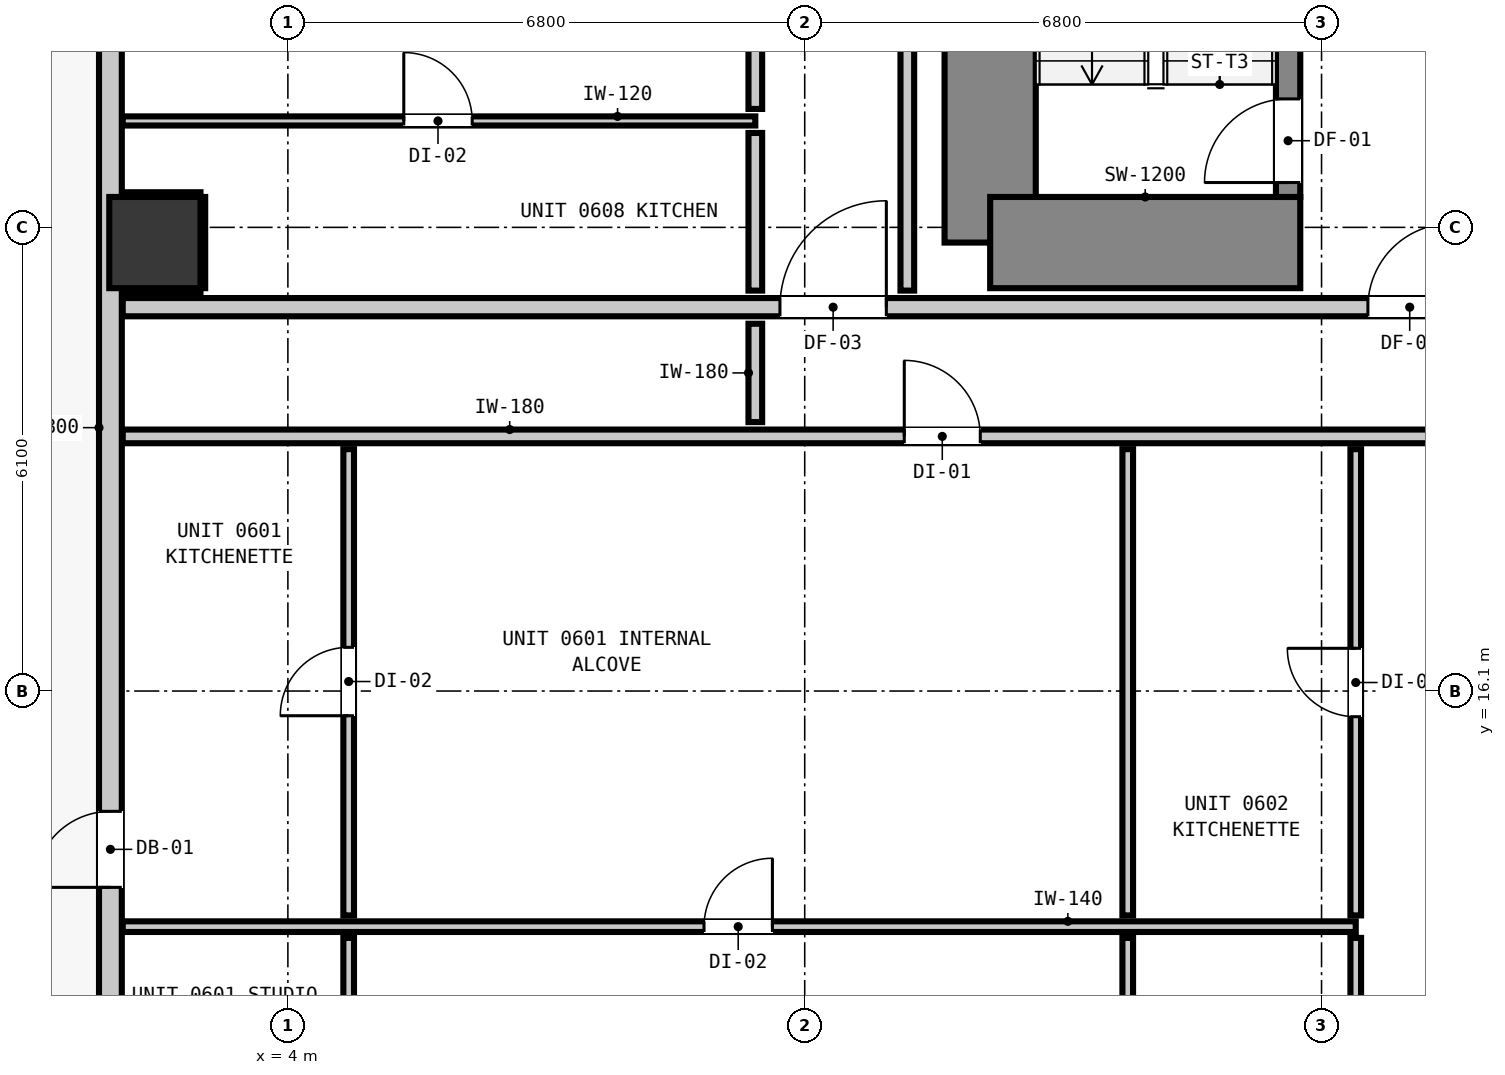
"""IFC4 building model, lengths in metres.
Left out: names, types, materials, properties, quantities, classifications, styles, units other than length and angle.
Written with IfcOpenShell. Run it as: python <this file> out.ifc"""

import sys

from ifc_helpers import new_model, si_unit, direction, frame, frame_2d, origin, origin_2d, place, context, subcontext, project, spatial, rectangle, extrude, element, fill, save


model = new_model("IFC4")
c1 = context("Model", 3, precision=1e-05, world=origin(), true_north=direction((0.0, 1.0)))
c2 = subcontext(c1, "Body", "Model", "MODEL_VIEW")
j1 = project(units=[si_unit("LENGTHUNIT", "METRE"), si_unit("PLANEANGLEUNIT", "RADIAN")], contexts=[c1])
p1 = place(None, origin())
s1 = spatial("IfcSite", under=j1, at=p1, CompositionType="ELEMENT")
p2 = place(p1, origin())
s2 = spatial("IfcBuilding", under=s1, at=p2, CompositionType="ELEMENT")
p3 = place(p2, frame((0.0, 0.0, 25.32)))
s3 = spatial("IfcBuildingStorey", under=s2, at=p3, CompositionType="ELEMENT", Elevation=25.32)
p4 = place(p3, frame((13.24, 22.0, 0.0), z_axis=(0.0, 0.0, 1.0), x_axis=(0.0, 1.0, 0.0)))
e1 = element("IfcWall", 1, at=p4, inside=s3, PredefinedType="SHEAR", context=c2, shape_type="SweptSolid", body=[
    extrude(rectangle(XDim=8.195, YDim=1.2, at=frame_2d((4.098, 0.0))), origin(), (0.0, 0.0, 1.0), 3.32),
])
p5 = place(p3, frame((13.24, 22.0, 0.0), z_axis=(0.0, 0.0, 1.0), x_axis=(1.0, 0.0, 0.0)))
e2 = element("IfcWall", 2, at=p5, inside=s3, PredefinedType="SHEAR", context=c2, shape_type="SweptSolid", body=[
    extrude(rectangle(XDim=4.08, YDim=1.2, at=frame_2d((2.04, 0.0))), origin(), (0.0, 0.0, 1.0), 3.32),
])
p6 = place(p3, frame((17.16, 22.6, 0.0), z_axis=(0.0, 0.0, 1.0), x_axis=(0.0, 1.0, 0.0)))
e3 = element("IfcWall", 3, at=p6, inside=s3, PredefinedType="SHEAR", context=c2, shape_type="SweptSolid", body=[
    extrude(rectangle(XDim=7.8, YDim=0.32, at=frame_2d((3.9, 0.0))), origin(), (0.0, 0.0, 1.0), 3.32),
])
p7 = place(p6, frame((0.19, 0.0, 0.0)))
e4 = element("IfcOpeningElement", 4, at=p7, cuts=e3, PredefinedType="OPENING", context=c2, shape_type="SweptSolid", body=[
    extrude(rectangle(XDim=1.1, YDim=2.15, at=frame_2d((0.55, 1.075))), frame((0.0, 0.17, 0.0), z_axis=(0.0, -1.0, 0.0), x_axis=(1.0, 0.0, 0.0)), (0.0, 0.0, 1.0), 0.34),
])
p8 = place(p3, frame((2.25, 22.0, 0.0), z_axis=(0.0, 0.0, 1.0), x_axis=(1.0, 0.0, 0.0)))
e5 = element("IfcColumn", 5, at=p8, inside=s3, PredefinedType="COLUMN", context=c2, shape_type="SweptSolid", body=[
    extrude(rectangle(XDim=1.2, YDim=1.2, at=origin_2d()), origin(), (0.0, 0.0, 1.0), 3.32),
])
p9 = place(p3, frame((1.665, 10.165, 0.0), z_axis=(0.0, 0.0, 1.0), x_axis=(0.0, 1.0, 0.0)))
e6 = element("IfcWall", 6, at=p9, inside=s3, PredefinedType="STANDARD", context=c2, shape_type="SweptSolid", body=[
    extrude(rectangle(XDim=34.67, YDim=0.3, at=frame_2d((17.335, 0.0))), origin(), (0.0, 0.0, 1.0), 3.06),
])
p10 = place(p9, frame((3.352, 0.0, 0.0)))
e7 = element("IfcOpeningElement", 7, at=p10, cuts=e6, PredefinedType="OPENING", context=c2, shape_type="SweptSolid", body=[
    extrude(rectangle(XDim=1.0, YDim=2.15, at=frame_2d((0.5, 1.075))), frame((0.0, 0.16, 0.0), z_axis=(0.0, -1.0, 0.0), x_axis=(1.0, 0.0, 0.0)), (0.0, 0.0, 1.0), 0.32),
])
p11 = place(p9, frame((14.448, 0.0, 0.85)))
e8 = element("IfcOpeningElement", 8, at=p11, cuts=e6, PredefinedType="OPENING", context=c2, shape_type="SweptSolid", body=[
    extrude(rectangle(XDim=1.65, YDim=1.75, at=frame_2d((0.825, 0.875))), frame((0.0, 0.16, 0.0), z_axis=(0.0, -1.0, 0.0), x_axis=(1.0, 0.0, 0.0)), (0.0, 0.0, 1.0), 0.32),
])
p12 = place(p9, frame((17.598, 0.0, 0.85)))
e9 = element("IfcOpeningElement", 9, at=p12, cuts=e6, PredefinedType="OPENING", context=c2, shape_type="SweptSolid", body=[
    extrude(rectangle(XDim=1.65, YDim=1.75, at=frame_2d((0.825, 0.875))), frame((0.0, 0.16, 0.0), z_axis=(0.0, -1.0, 0.0), x_axis=(1.0, 0.0, 0.0)), (0.0, 0.0, 1.0), 0.32),
])
p13 = place(p9, frame((23.982, 0.0, 0.85)))
e10 = element("IfcOpeningElement", 10, at=p13, cuts=e6, PredefinedType="OPENING", context=c2, shape_type="SweptSolid", body=[
    extrude(rectangle(XDim=1.65, YDim=1.75, at=frame_2d((0.825, 0.875))), frame((0.0, 0.16, 0.0), z_axis=(0.0, -1.0, 0.0), x_axis=(1.0, 0.0, 0.0)), (0.0, 0.0, 1.0), 0.32),
])
p14 = place(p9, frame((27.333, 0.0, 0.85)))
e11 = element("IfcOpeningElement", 11, at=p14, cuts=e6, PredefinedType="OPENING", context=c2, shape_type="SweptSolid", body=[
    extrude(rectangle(XDim=1.05, YDim=1.65, at=frame_2d((0.525, 0.825))), frame((0.0, 0.16, 0.0), z_axis=(0.0, -1.0, 0.0), x_axis=(1.0, 0.0, 0.0)), (0.0, 0.0, 1.0), 0.32),
])
p15 = place(p3, frame((1.827, 21.15, 0.0), z_axis=(0.0, 0.0, 1.0), x_axis=(1.0, 0.0, 0.0)))
e12 = element("IfcWall", 12, at=p15, inside=s3, PredefinedType="PARTITIONING", context=c2, shape_type="SweptSolid", body=[
    extrude(rectangle(XDim=42.146, YDim=0.24, at=frame_2d((21.073, 0.0))), origin(), (0.0, 0.0, 1.0), 3.06),
])
p16 = place(p15, frame((16.383, 0.0, 0.0)))
e13 = element("IfcOpeningElement", 13, at=p16, cuts=e12, PredefinedType="OPENING", context=c2, shape_type="SweptSolid", body=[
    extrude(rectangle(XDim=1.1, YDim=2.15, at=frame_2d((0.55, 1.075))), frame((0.0, 0.13, 0.0), z_axis=(0.0, -1.0, 0.0), x_axis=(1.0, 0.0, 0.0)), (0.0, 0.0, 1.0), 0.26),
])
p17 = place(p15, frame((8.647, 0.0, 0.0)))
e14 = element("IfcOpeningElement", 14, at=p17, cuts=e12, PredefinedType="OPENING", context=c2, shape_type="SweptSolid", body=[
    extrude(rectangle(XDim=1.4, YDim=2.15, at=frame_2d((0.7, 1.075))), frame((0.0, 0.13, 0.0), z_axis=(0.0, -1.0, 0.0), x_axis=(1.0, 0.0, 0.0)), (0.0, 0.0, 1.0), 0.26),
])
p18 = place(p15, frame((38.524, 0.0, 0.0)))
e15 = element("IfcOpeningElement", 15, at=p18, cuts=e12, PredefinedType="OPENING", context=c2, shape_type="SweptSolid", body=[
    extrude(rectangle(XDim=1.0, YDim=2.15, at=frame_2d((0.5, 1.075))), frame((0.0, 0.13, 0.0), z_axis=(0.0, -1.0, 0.0), x_axis=(1.0, 0.0, 0.0)), (0.0, 0.0, 1.0), 0.26),
])
p19 = place(p3, frame((1.827, 19.45, 0.0), z_axis=(0.0, 0.0, 1.0), x_axis=(1.0, 0.0, 0.0)))
e16 = element("IfcWall", 16, at=p19, inside=s3, PredefinedType="PARTITIONING", context=c2, shape_type="SweptSolid", body=[
    extrude(rectangle(XDim=42.146, YDim=0.18, at=frame_2d((21.073, 0.0))), origin(), (0.0, 0.0, 1.0), 3.06),
])
p20 = place(p19, frame((10.283, 0.0, 0.0)))
e17 = element("IfcOpeningElement", 17, at=p20, cuts=e16, PredefinedType="OPENING", context=c2, shape_type="SweptSolid", body=[
    extrude(rectangle(XDim=1.0, YDim=2.15, at=frame_2d((0.5, 1.075))), frame((0.0, 0.1, 0.0), z_axis=(0.0, -1.0, 0.0), x_axis=(1.0, 0.0, 0.0)), (0.0, 0.0, 1.0), 0.2),
])
p21 = place(p19, frame((17.475, 0.0, 0.0)))
e18 = element("IfcOpeningElement", 18, at=p21, cuts=e16, PredefinedType="OPENING", context=c2, shape_type="SweptSolid", body=[
    extrude(rectangle(XDim=1.0, YDim=2.15, at=frame_2d((0.5, 1.075))), frame((0.0, 0.1, 0.0), z_axis=(0.0, -1.0, 0.0), x_axis=(1.0, 0.0, 0.0)), (0.0, 0.0, 1.0), 0.2),
])
p22 = place(p19, frame((25.928, 0.0, 0.0)))
e19 = element("IfcOpeningElement", 19, at=p22, cuts=e16, PredefinedType="OPENING", context=c2, shape_type="SweptSolid", body=[
    extrude(rectangle(XDim=1.0, YDim=2.15, at=frame_2d((0.5, 1.075))), frame((0.0, 0.1, 0.0), z_axis=(0.0, -1.0, 0.0), x_axis=(1.0, 0.0, 0.0)), (0.0, 0.0, 1.0), 0.2),
])
p23 = place(p19, frame((35.193, 0.0, 0.0)))
e20 = element("IfcOpeningElement", 20, at=p23, cuts=e16, PredefinedType="OPENING", context=c2, shape_type="SweptSolid", body=[
    extrude(rectangle(XDim=1.0, YDim=2.15, at=frame_2d((0.5, 1.075))), frame((0.0, 0.1, 0.0), z_axis=(0.0, -1.0, 0.0), x_axis=(1.0, 0.0, 0.0)), (0.0, 0.0, 1.0), 0.2),
])
p24 = place(p3, frame((1.827, 13.0, 0.0), z_axis=(0.0, 0.0, 1.0), x_axis=(1.0, 0.0, 0.0)))
e21 = element("IfcWall", 21, at=p24, inside=s3, PredefinedType="PARTITIONING", context=c2, shape_type="SweptSolid", body=[
    extrude(rectangle(XDim=16.223, YDim=0.14, at=frame_2d((8.112, 0.0))), origin(), (0.0, 0.0, 1.0), 3.06),
])
p25 = place(p24, frame((7.648, 0.0, 0.0)))
e22 = element("IfcOpeningElement", 22, at=p25, cuts=e21, PredefinedType="OPENING", context=c2, shape_type="SweptSolid", body=[
    extrude(rectangle(XDim=0.9, YDim=2.1, at=frame_2d((0.45, 1.05))), frame((0.0, 0.08, 0.0), z_axis=(0.0, -1.0, 0.0), x_axis=(1.0, 0.0, 0.0)), (0.0, 0.0, 1.0), 0.16),
])
p26 = place(p3, frame((1.827, 23.6, 0.0), z_axis=(0.0, 0.0, 1.0), x_axis=(1.0, 0.0, 0.0)))
e23 = element("IfcWall", 23, at=p26, inside=s3, PredefinedType="PARTITIONING", context=c2, shape_type="SweptSolid", body=[
    extrude(rectangle(XDim=8.323, YDim=0.12, at=frame_2d((4.162, 0.0))), origin(), (0.0, 0.0, 1.0), 3.06),
])
p27 = place(p26, frame((3.698, 0.0, 0.0)))
e24 = element("IfcOpeningElement", 24, at=p27, cuts=e23, PredefinedType="OPENING", context=c2, shape_type="SweptSolid", body=[
    extrude(rectangle(XDim=0.9, YDim=2.1, at=frame_2d((0.45, 1.05))), frame((0.0, 0.07, 0.0), z_axis=(0.0, -1.0, 0.0), x_axis=(1.0, 0.0, 0.0)), (0.0, 0.0, 1.0), 0.14),
])
p28 = place(p3, frame((10.15, 19.638, 0.0), z_axis=(0.0, 0.0, 1.0), x_axis=(0.0, 1.0, 0.0)))
e25 = element("IfcWall", 25, at=p28, inside=s3, PredefinedType="PARTITIONING", context=c2, shape_type="SweptSolid", body=[
    extrude(rectangle(XDim=1.294, YDim=0.18, at=frame_2d((0.647, 0.0))), origin(), (0.0, 0.0, 1.0), 3.06),
])
p29 = place(p3, frame((10.15, 21.368, 0.0), z_axis=(0.0, 0.0, 1.0), x_axis=(0.0, 1.0, 0.0)))
e26 = element("IfcWall", 26, at=p29, inside=s3, PredefinedType="PARTITIONING", context=c2, shape_type="SweptSolid", body=[
    extrude(rectangle(XDim=2.074, YDim=0.18, at=frame_2d((1.037, 0.0))), origin(), (0.0, 0.0, 1.0), 3.06),
])
p30 = place(p3, frame((10.15, 23.758, 0.0), z_axis=(0.0, 0.0, 1.0), x_axis=(0.0, 1.0, 0.0)))
e27 = element("IfcWall", 27, at=p30, inside=s3, PredefinedType="PARTITIONING", context=c2, shape_type="SweptSolid", body=[
    extrude(rectangle(XDim=3.349, YDim=0.18, at=frame_2d((1.674, 0.0))), origin(), (0.0, 0.0, 1.0), 3.06),
])
p31 = place(p30, frame((1.18, 0.0, 0.0)))
e28 = element("IfcOpeningElement", 28, at=p31, cuts=e27, PredefinedType="OPENING", context=c2, shape_type="SweptSolid", body=[
    extrude(rectangle(XDim=1.0, YDim=2.15, at=frame_2d((0.5, 1.075))), frame((0.0, 0.1, 0.0), z_axis=(0.0, -1.0, 0.0), x_axis=(1.0, 0.0, 0.0)), (0.0, 0.0, 1.0), 0.2),
])
p32 = place(p3, frame((12.15, 21.368, 0.0), z_axis=(0.0, 0.0, 1.0), x_axis=(0.0, 1.0, 0.0)))
e29 = element("IfcWall", 29, at=p32, inside=s3, PredefinedType="PARTITIONING", context=c2, shape_type="SweptSolid", body=[
    extrude(rectangle(XDim=18.694, YDim=0.18, at=frame_2d((9.347, 0.0))), origin(), (0.0, 0.0, 1.0), 3.06),
])
p33 = place(p3, frame((4.8, 7.827, 0.0), z_axis=(0.0, 0.0, 1.0), x_axis=(0.0, 1.0, 0.0)))
e30 = element("IfcWall", 30, at=p33, inside=s3, PredefinedType="PARTITIONING", context=c2, shape_type="SweptSolid", body=[
    extrude(rectangle(XDim=5.025, YDim=0.14, at=frame_2d((2.513, 0.0))), origin(), (0.0, 0.0, 1.0), 3.06),
])
p34 = place(p33, frame((2.143, 0.0, 0.0)))
e31 = element("IfcOpeningElement", 31, at=p34, cuts=e30, PredefinedType="OPENING", context=c2, shape_type="SweptSolid", body=[
    extrude(rectangle(XDim=0.86, YDim=2.02, at=frame_2d((0.43, 1.01))), frame((0.0, 0.08, 0.0), z_axis=(0.0, -1.0, 0.0), x_axis=(1.0, 0.0, 0.0)), (0.0, 0.0, 1.0), 0.16),
])
p35 = place(p3, frame((4.8, 13.148, 0.0), z_axis=(0.0, 0.0, 1.0), x_axis=(0.0, 1.0, 0.0)))
e32 = element("IfcWall", 32, at=p35, inside=s3, PredefinedType="PARTITIONING", context=c2, shape_type="SweptSolid", body=[
    extrude(rectangle(XDim=6.134, YDim=0.14, at=frame_2d((3.067, 0.0))), origin(), (0.0, 0.0, 1.0), 3.06),
])
p36 = place(p35, frame((2.627, 0.0, 0.0)))
e33 = element("IfcOpeningElement", 33, at=p36, cuts=e32, PredefinedType="OPENING", context=c2, shape_type="SweptSolid", body=[
    extrude(rectangle(XDim=0.9, YDim=2.1, at=frame_2d((0.45, 1.05))), frame((0.0, 0.08, 0.0), z_axis=(0.0, -1.0, 0.0), x_axis=(1.0, 0.0, 0.0)), (0.0, 0.0, 1.0), 0.16),
])
p37 = place(p3, frame((15.05, 7.827, 0.0), z_axis=(0.0, 0.0, 1.0), x_axis=(0.0, 1.0, 0.0)))
e34 = element("IfcWall", 34, at=p37, inside=s3, PredefinedType="PARTITIONING", context=c2, shape_type="SweptSolid", body=[
    extrude(rectangle(XDim=5.025, YDim=0.14, at=frame_2d((2.513, 0.0))), origin(), (0.0, 0.0, 1.0), 3.06),
])
p38 = place(p3, frame((15.05, 13.148, 0.0), z_axis=(0.0, 0.0, 1.0), x_axis=(0.0, 1.0, 0.0)))
e35 = element("IfcWall", 35, at=p38, inside=s3, PredefinedType="PARTITIONING", context=c2, shape_type="SweptSolid", body=[
    extrude(rectangle(XDim=6.134, YDim=0.14, at=frame_2d((3.067, 0.0))), origin(), (0.0, 0.0, 1.0), 3.06),
])
p39 = place(p3, frame((18.05, 7.827, 0.0), z_axis=(0.0, 0.0, 1.0), x_axis=(0.0, 1.0, 0.0)))
e36 = element("IfcWall", 36, at=p39, inside=s3, PredefinedType="PARTITIONING", context=c2, shape_type="SweptSolid", body=[
    extrude(rectangle(XDim=5.025, YDim=0.14, at=frame_2d((2.513, 0.0))), origin(), (0.0, 0.0, 1.0), 3.06),
])
p40 = place(p39, frame((2.156, 0.0, 0.0)))
e37 = element("IfcOpeningElement", 37, at=p40, cuts=e36, PredefinedType="OPENING", context=c2, shape_type="SweptSolid", body=[
    extrude(rectangle(XDim=0.86, YDim=2.02, at=frame_2d((0.43, 1.01))), frame((0.0, 0.08, 0.0), z_axis=(0.0, -1.0, 0.0), x_axis=(1.0, 0.0, 0.0)), (0.0, 0.0, 1.0), 0.16),
])
p41 = place(p3, frame((18.05, 13.148, 0.0), z_axis=(0.0, 0.0, 1.0), x_axis=(0.0, 1.0, 0.0)))
e38 = element("IfcWall", 38, at=p41, inside=s3, PredefinedType="PARTITIONING", context=c2, shape_type="SweptSolid", body=[
    extrude(rectangle(XDim=6.134, YDim=0.14, at=frame_2d((3.067, 0.0))), origin(), (0.0, 0.0, 1.0), 3.06),
])
p42 = place(p41, frame((2.614, 0.0, 0.0)))
e39 = element("IfcOpeningElement", 39, at=p42, cuts=e38, PredefinedType="OPENING", context=c2, shape_type="SweptSolid", body=[
    extrude(rectangle(XDim=0.9, YDim=2.1, at=frame_2d((0.45, 1.05))), frame((0.0, 0.08, 0.0), z_axis=(0.0, -1.0, 0.0), x_axis=(1.0, 0.0, 0.0)), (0.0, 0.0, 1.0), 0.16),
])
for number, where, z_axis, x_axis in (
    (40, (1.83, 21.368, 0.0), (0.0, 0.0, 1.0), (1.0, 0.0, 0.0)),
    (41, (1.83, 22.632, 0.0), (0.0, 0.0, 1.0), (1.0, 0.0, 0.0)),
):
    element("IfcWall", number, at=place(p3, frame(where, z_axis=z_axis, x_axis=x_axis)), inside=s3, PredefinedType="PARTITIONING", context=c2, shape_type="SweptSolid", body=[
        extrude(rectangle(XDim=1.02, YDim=0.06, at=frame_2d((0.51, 0.0))), origin(), (0.0, 0.0, 1.0), 1.45),
    ])
p43 = place(p3, frame((2.882, 21.4, 0.0), z_axis=(0.0, 0.0, 1.0), x_axis=(0.0, 1.0, 0.0)))
e42 = element("IfcWall", 42, at=p43, inside=s3, PredefinedType="PARTITIONING", context=c2, shape_type="SweptSolid", body=[
    extrude(rectangle(XDim=1.2, YDim=0.06, at=frame_2d((0.6, 0.0))), origin(), (0.0, 0.0, 1.0), 1.45),
])
p44 = place(p10, origin())
e43 = element("IfcDoor", 43, at=p44, inside=s3, OperationType="SINGLE_SWING_LEFT", PredefinedType="DOOR", context=c2, shape_type="SweptSolid", body=[
    extrude(rectangle(XDim=1.0, YDim=2.15, at=frame_2d((0.5, 1.075))), frame((0.0, 0.025, 0.0), z_axis=(0.0, -1.0, 0.0), x_axis=(1.0, 0.0, 0.0)), (0.0, 0.0, 1.0), 0.05),
])
fill(e7, e43)
p45 = place(p7, origin())
e44 = element("IfcDoor", 44, at=p45, inside=s3, OperationType="SINGLE_SWING_LEFT", PredefinedType="DOOR", context=c2, shape_type="SweptSolid", body=[
    extrude(rectangle(XDim=1.1, YDim=2.15, at=frame_2d((0.55, 1.075))), frame((0.0, 0.025, 0.0), z_axis=(0.0, -1.0, 0.0), x_axis=(1.0, 0.0, 0.0)), (0.0, 0.0, 1.0), 0.05),
])
fill(e4, e44)
p46 = place(p16, origin())
e45 = element("IfcDoor", 45, at=p46, inside=s3, OperationType="SINGLE_SWING_RIGHT", PredefinedType="DOOR", context=c2, shape_type="SweptSolid", body=[
    extrude(rectangle(XDim=1.1, YDim=2.15, at=frame_2d((0.55, 1.075))), frame((0.0, 0.025, 0.0), z_axis=(0.0, -1.0, 0.0), x_axis=(1.0, 0.0, 0.0)), (0.0, 0.0, 1.0), 0.05),
])
fill(e13, e45)
p47 = place(p17, origin())
e46 = element("IfcDoor", 46, at=p47, inside=s3, OperationType="SINGLE_SWING_RIGHT", PredefinedType="DOOR", context=c2, shape_type="SweptSolid", body=[
    extrude(rectangle(XDim=1.4, YDim=2.15, at=frame_2d((0.7, 1.075))), frame((0.0, 0.025, 0.0), z_axis=(0.0, -1.0, 0.0), x_axis=(1.0, 0.0, 0.0)), (0.0, 0.0, 1.0), 0.05),
])
fill(e14, e46)
p48 = place(p20, origin())
e47 = element("IfcDoor", 47, at=p48, inside=s3, OperationType="SINGLE_SWING_LEFT", PredefinedType="DOOR", context=c2, shape_type="SweptSolid", body=[
    extrude(rectangle(XDim=1.0, YDim=2.15, at=frame_2d((0.5, 1.075))), frame((0.0, 0.025, 0.0), z_axis=(0.0, -1.0, 0.0), x_axis=(1.0, 0.0, 0.0)), (0.0, 0.0, 1.0), 0.05),
])
fill(e17, e47)
p49 = place(p25, origin())
e48 = element("IfcDoor", 48, at=p49, inside=s3, OperationType="SINGLE_SWING_RIGHT", PredefinedType="DOOR", context=c2, shape_type="SweptSolid", body=[
    extrude(rectangle(XDim=0.9, YDim=2.1, at=frame_2d((0.45, 1.05))), frame((0.0, 0.025, 0.0), z_axis=(0.0, -1.0, 0.0), x_axis=(1.0, 0.0, 0.0)), (0.0, 0.0, 1.0), 0.05),
])
fill(e22, e48)
p50 = place(p36, origin())
e49 = element("IfcDoor", 49, at=p50, inside=s3, OperationType="SINGLE_SWING_LEFT", PredefinedType="DOOR", context=c2, shape_type="SweptSolid", body=[
    extrude(rectangle(XDim=0.9, YDim=2.1, at=frame_2d((0.45, 1.05))), frame((0.0, 0.025, 0.0), z_axis=(0.0, -1.0, 0.0), x_axis=(1.0, 0.0, 0.0)), (0.0, 0.0, 1.0), 0.05),
])
fill(e33, e49)
p51 = place(p42, origin())
e50 = element("IfcDoor", 50, at=p51, inside=s3, OperationType="SINGLE_SWING_RIGHT", PredefinedType="DOOR", context=c2, shape_type="SweptSolid", body=[
    extrude(rectangle(XDim=0.9, YDim=2.1, at=frame_2d((0.45, 1.05))), frame((0.0, 0.025, 0.0), z_axis=(0.0, -1.0, 0.0), x_axis=(1.0, 0.0, 0.0)), (0.0, 0.0, 1.0), 0.05),
])
fill(e39, e50)
p52 = place(p27, origin())
e51 = element("IfcDoor", 51, at=p52, inside=s3, OperationType="SINGLE_SWING_LEFT", PredefinedType="DOOR", context=c2, shape_type="SweptSolid", body=[
    extrude(rectangle(XDim=0.9, YDim=2.1, at=frame_2d((0.45, 1.05))), frame((0.0, 0.025, 0.0), z_axis=(0.0, -1.0, 0.0), x_axis=(1.0, 0.0, 0.0)), (0.0, 0.0, 1.0), 0.05),
])
fill(e24, e51)
save(model, sys.argv[1])
